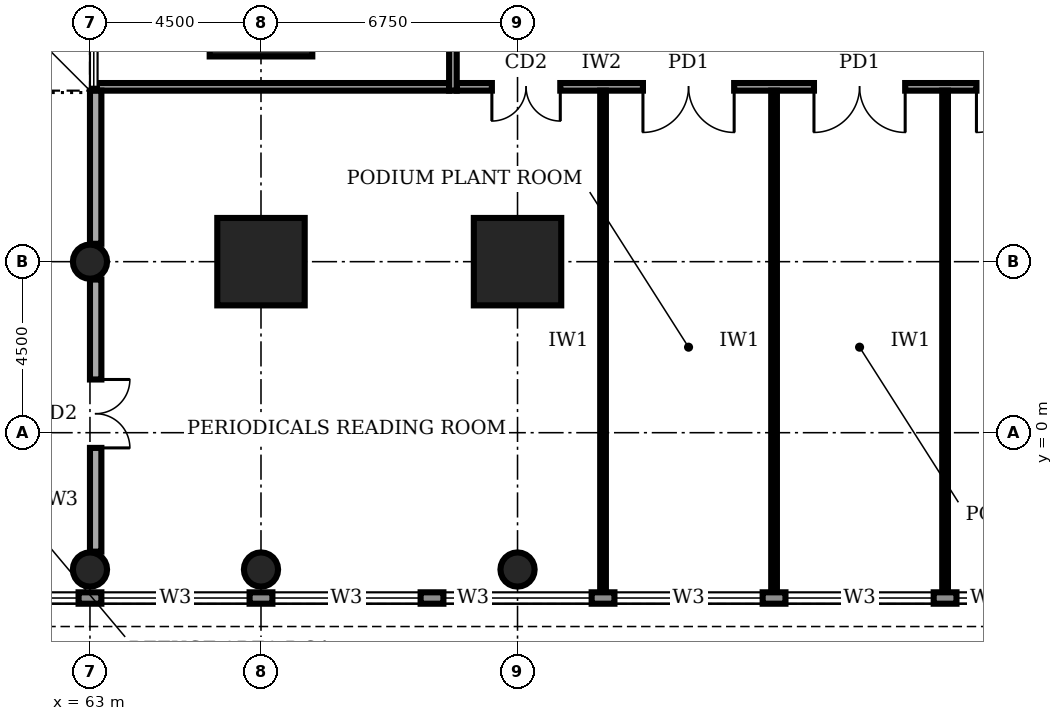
"""IFC4 building model, lengths in metres.
Left out: names, types, materials, properties, quantities, classifications, styles, units other than length and angle.
Written with IfcOpenShell. Run it as: python <this file> out.ifc"""

import sys

from ifc_helpers import new_model, si_unit, direction, frame, frame_2d, origin, origin_2d, place, context, subcontext, project, spatial, rectangle, circle, extrude, element, fill, save


model = new_model("IFC4")
c1 = context("Model", 3, precision=1e-05, world=origin(), true_north=direction((0.0, 1.0)))
c2 = subcontext(c1, "Body", "Model", "MODEL_VIEW")
j1 = project(units=[si_unit("LENGTHUNIT", "METRE"), si_unit("PLANEANGLEUNIT", "RADIAN")], contexts=[c1])
p1 = place(None, origin())
s1 = spatial("IfcSite", under=j1, at=p1, CompositionType="ELEMENT")
p2 = place(p1, origin())
s2 = spatial("IfcBuilding", under=s1, at=p2, CompositionType="ELEMENT")
p3 = place(p2, frame((0.0, 0.0, 16.0)))
s3 = spatial("IfcBuildingStorey", under=s2, at=p3, CompositionType="ELEMENT", Elevation=16.0)
for number, where, z_axis, x_axis in (
    (1, (67.5, 4.5, 0.0), (0.0, 0.0, 1.0), (1.0, 0.0, 0.0)),
    (2, (74.25, 4.5, 0.0), (0.0, 0.0, 1.0), (1.0, 0.0, 0.0)),
):
    element("IfcColumn", number, at=place(p3, frame(where, z_axis=z_axis, x_axis=x_axis)), inside=s3, PredefinedType="COLUMN", context=c2, shape_type="SweptSolid", body=[
        extrude(rectangle(XDim=2.3, YDim=2.3, at=origin_2d()), origin(), (0.0, 0.0, 1.0), 5.0),
    ])
p4 = place(p3, frame((67.5, 11.25, 0.0), z_axis=(0.0, 0.0, 1.0), x_axis=(1.0, 0.0, 0.0)))
e3 = element("IfcColumn", 3, at=p4, inside=s3, PredefinedType="COLUMN", context=c2, shape_type="SweptSolid", body=[
    extrude(rectangle(XDim=2.7, YDim=2.7, at=origin_2d()), origin(), (0.0, 0.0, 1.0), 5.0),
])
for number, where, z_axis, x_axis in (
    (4, (63.0, -3.6, 0.0), (0.0, 0.0, 1.0), (1.0, 0.0, 0.0)),
    (5, (67.5, -3.6, 0.0), (0.0, 0.0, 1.0), (1.0, 0.0, 0.0)),
    (6, (74.25, -3.6, 0.0), (0.0, 0.0, 1.0), (1.0, 0.0, 0.0)),
    (7, (63.0, 4.5, 0.0), (0.0, 0.0, 1.0), (1.0, 0.0, 0.0)),
):
    element("IfcColumn", number, at=place(p3, frame(where, z_axis=z_axis, x_axis=x_axis)), inside=s3, PredefinedType="COLUMN", context=c2, shape_type="SweptSolid", body=[
        extrude(circle(Radius=0.45, at=origin_2d()), origin(), (0.0, 0.0, 1.0), 5.0),
    ])
p5 = place(p3, frame((0.02, -4.35, 0.0), z_axis=(0.0, 0.0, 1.0), x_axis=(1.0, 0.0, 0.0)))
e8 = element("IfcWall", 8, at=p5, inside=s3, PredefinedType="STANDARD", context=c2, shape_type="SweptSolid", body=[
    extrude(rectangle(XDim=98.96, YDim=0.3, at=frame_2d((49.48, 0.0))), origin(), (0.0, 0.0, 1.0), 4.7),
])
p6 = place(p5, frame((4.78, 0.0, 0.95)))
e9 = element("IfcOpeningElement", 9, at=p6, cuts=e8, PredefinedType="OPENING", context=c2, shape_type="SweptSolid", body=[
    extrude(rectangle(XDim=3.9, YDim=1.8, at=frame_2d((1.95, 0.9))), frame((0.0, 0.16, 0.0), z_axis=(0.0, -1.0, 0.0), x_axis=(1.0, 0.0, 0.0)), (0.0, 0.0, 1.0), 0.32),
])
p7 = place(p5, frame((9.28, 0.0, 0.95)))
e10 = element("IfcOpeningElement", 10, at=p7, cuts=e8, PredefinedType="OPENING", context=c2, shape_type="SweptSolid", body=[
    extrude(rectangle(XDim=3.9, YDim=1.8, at=frame_2d((1.95, 0.9))), frame((0.0, 0.16, 0.0), z_axis=(0.0, -1.0, 0.0), x_axis=(1.0, 0.0, 0.0)), (0.0, 0.0, 1.0), 0.32),
])
p8 = place(p5, frame((13.78, 0.0, 0.95)))
e11 = element("IfcOpeningElement", 11, at=p8, cuts=e8, PredefinedType="OPENING", context=c2, shape_type="SweptSolid", body=[
    extrude(rectangle(XDim=3.9, YDim=1.8, at=frame_2d((1.95, 0.9))), frame((0.0, 0.16, 0.0), z_axis=(0.0, -1.0, 0.0), x_axis=(1.0, 0.0, 0.0)), (0.0, 0.0, 1.0), 0.32),
])
p9 = place(p5, frame((18.28, 0.0, 0.95)))
e12 = element("IfcOpeningElement", 12, at=p9, cuts=e8, PredefinedType="OPENING", context=c2, shape_type="SweptSolid", body=[
    extrude(rectangle(XDim=3.9, YDim=1.8, at=frame_2d((1.95, 0.9))), frame((0.0, 0.16, 0.0), z_axis=(0.0, -1.0, 0.0), x_axis=(1.0, 0.0, 0.0)), (0.0, 0.0, 1.0), 0.32),
])
p10 = place(p5, frame((22.78, 0.0, 0.95)))
e13 = element("IfcOpeningElement", 13, at=p10, cuts=e8, PredefinedType="OPENING", context=c2, shape_type="SweptSolid", body=[
    extrude(rectangle(XDim=3.9, YDim=1.8, at=frame_2d((1.95, 0.9))), frame((0.0, 0.16, 0.0), z_axis=(0.0, -1.0, 0.0), x_axis=(1.0, 0.0, 0.0)), (0.0, 0.0, 1.0), 0.32),
])
p11 = place(p5, frame((27.28, 0.0, 0.95)))
e14 = element("IfcOpeningElement", 14, at=p11, cuts=e8, PredefinedType="OPENING", context=c2, shape_type="SweptSolid", body=[
    extrude(rectangle(XDim=3.9, YDim=1.8, at=frame_2d((1.95, 0.9))), frame((0.0, 0.16, 0.0), z_axis=(0.0, -1.0, 0.0), x_axis=(1.0, 0.0, 0.0)), (0.0, 0.0, 1.0), 0.32),
])
p12 = place(p5, frame((31.78, 0.0, 0.95)))
e15 = element("IfcOpeningElement", 15, at=p12, cuts=e8, PredefinedType="OPENING", context=c2, shape_type="SweptSolid", body=[
    extrude(rectangle(XDim=3.9, YDim=1.8, at=frame_2d((1.95, 0.9))), frame((0.0, 0.16, 0.0), z_axis=(0.0, -1.0, 0.0), x_axis=(1.0, 0.0, 0.0)), (0.0, 0.0, 1.0), 0.32),
])
p13 = place(p5, frame((36.28, 0.0, 0.95)))
e16 = element("IfcOpeningElement", 16, at=p13, cuts=e8, PredefinedType="OPENING", context=c2, shape_type="SweptSolid", body=[
    extrude(rectangle(XDim=3.9, YDim=1.8, at=frame_2d((1.95, 0.9))), frame((0.0, 0.16, 0.0), z_axis=(0.0, -1.0, 0.0), x_axis=(1.0, 0.0, 0.0)), (0.0, 0.0, 1.0), 0.32),
])
p14 = place(p5, frame((40.78, 0.0, 0.95)))
e17 = element("IfcOpeningElement", 17, at=p14, cuts=e8, PredefinedType="OPENING", context=c2, shape_type="SweptSolid", body=[
    extrude(rectangle(XDim=3.9, YDim=1.8, at=frame_2d((1.95, 0.9))), frame((0.0, 0.16, 0.0), z_axis=(0.0, -1.0, 0.0), x_axis=(1.0, 0.0, 0.0)), (0.0, 0.0, 1.0), 0.32),
])
p15 = place(p5, frame((45.28, 0.0, 0.95)))
e18 = element("IfcOpeningElement", 18, at=p15, cuts=e8, PredefinedType="OPENING", context=c2, shape_type="SweptSolid", body=[
    extrude(rectangle(XDim=3.9, YDim=1.8, at=frame_2d((1.95, 0.9))), frame((0.0, 0.16, 0.0), z_axis=(0.0, -1.0, 0.0), x_axis=(1.0, 0.0, 0.0)), (0.0, 0.0, 1.0), 0.32),
])
p16 = place(p5, frame((49.78, 0.0, 0.95)))
e19 = element("IfcOpeningElement", 19, at=p16, cuts=e8, PredefinedType="OPENING", context=c2, shape_type="SweptSolid", body=[
    extrude(rectangle(XDim=3.9, YDim=1.8, at=frame_2d((1.95, 0.9))), frame((0.0, 0.16, 0.0), z_axis=(0.0, -1.0, 0.0), x_axis=(1.0, 0.0, 0.0)), (0.0, 0.0, 1.0), 0.32),
])
p17 = place(p5, frame((54.28, 0.0, 0.95)))
e20 = element("IfcOpeningElement", 20, at=p17, cuts=e8, PredefinedType="OPENING", context=c2, shape_type="SweptSolid", body=[
    extrude(rectangle(XDim=3.9, YDim=1.8, at=frame_2d((1.95, 0.9))), frame((0.0, 0.16, 0.0), z_axis=(0.0, -1.0, 0.0), x_axis=(1.0, 0.0, 0.0)), (0.0, 0.0, 1.0), 0.32),
])
p18 = place(p5, frame((58.78, 0.0, 0.95)))
e21 = element("IfcOpeningElement", 21, at=p18, cuts=e8, PredefinedType="OPENING", context=c2, shape_type="SweptSolid", body=[
    extrude(rectangle(XDim=3.9, YDim=1.8, at=frame_2d((1.95, 0.9))), frame((0.0, 0.16, 0.0), z_axis=(0.0, -1.0, 0.0), x_axis=(1.0, 0.0, 0.0)), (0.0, 0.0, 1.0), 0.32),
])
p19 = place(p5, frame((63.28, 0.0, 0.95)))
e22 = element("IfcOpeningElement", 22, at=p19, cuts=e8, PredefinedType="OPENING", context=c2, shape_type="SweptSolid", body=[
    extrude(rectangle(XDim=3.9, YDim=1.8, at=frame_2d((1.95, 0.9))), frame((0.0, 0.16, 0.0), z_axis=(0.0, -1.0, 0.0), x_axis=(1.0, 0.0, 0.0)), (0.0, 0.0, 1.0), 0.32),
])
p20 = place(p5, frame((67.78, 0.0, 0.95)))
e23 = element("IfcOpeningElement", 23, at=p20, cuts=e8, PredefinedType="OPENING", context=c2, shape_type="SweptSolid", body=[
    extrude(rectangle(XDim=3.9, YDim=1.8, at=frame_2d((1.95, 0.9))), frame((0.0, 0.16, 0.0), z_axis=(0.0, -1.0, 0.0), x_axis=(1.0, 0.0, 0.0)), (0.0, 0.0, 1.0), 0.32),
])
p21 = place(p5, frame((72.28, 0.0, 0.95)))
e24 = element("IfcOpeningElement", 24, at=p21, cuts=e8, PredefinedType="OPENING", context=c2, shape_type="SweptSolid", body=[
    extrude(rectangle(XDim=3.9, YDim=1.8, at=frame_2d((1.95, 0.9))), frame((0.0, 0.16, 0.0), z_axis=(0.0, -1.0, 0.0), x_axis=(1.0, 0.0, 0.0)), (0.0, 0.0, 1.0), 0.32),
])
p22 = place(p5, frame((76.78, 0.0, 0.95)))
e25 = element("IfcOpeningElement", 25, at=p22, cuts=e8, PredefinedType="OPENING", context=c2, shape_type="SweptSolid", body=[
    extrude(rectangle(XDim=3.9, YDim=1.8, at=frame_2d((1.95, 0.9))), frame((0.0, 0.16, 0.0), z_axis=(0.0, -1.0, 0.0), x_axis=(1.0, 0.0, 0.0)), (0.0, 0.0, 1.0), 0.32),
])
p23 = place(p5, frame((81.28, 0.0, 0.95)))
e26 = element("IfcOpeningElement", 26, at=p23, cuts=e8, PredefinedType="OPENING", context=c2, shape_type="SweptSolid", body=[
    extrude(rectangle(XDim=3.9, YDim=1.8, at=frame_2d((1.95, 0.9))), frame((0.0, 0.16, 0.0), z_axis=(0.0, -1.0, 0.0), x_axis=(1.0, 0.0, 0.0)), (0.0, 0.0, 1.0), 0.32),
])
p24 = place(p5, frame((85.78, 0.0, 0.95)))
e27 = element("IfcOpeningElement", 27, at=p24, cuts=e8, PredefinedType="OPENING", context=c2, shape_type="SweptSolid", body=[
    extrude(rectangle(XDim=3.9, YDim=1.8, at=frame_2d((1.95, 0.9))), frame((0.0, 0.16, 0.0), z_axis=(0.0, -1.0, 0.0), x_axis=(1.0, 0.0, 0.0)), (0.0, 0.0, 1.0), 0.32),
])
p25 = place(p5, frame((90.28, 0.0, 0.95)))
e28 = element("IfcOpeningElement", 28, at=p25, cuts=e8, PredefinedType="OPENING", context=c2, shape_type="SweptSolid", body=[
    extrude(rectangle(XDim=3.9, YDim=1.8, at=frame_2d((1.95, 0.9))), frame((0.0, 0.16, 0.0), z_axis=(0.0, -1.0, 0.0), x_axis=(1.0, 0.0, 0.0)), (0.0, 0.0, 1.0), 0.32),
])
p26 = place(p5, frame((94.78, 0.0, 0.95)))
e29 = element("IfcOpeningElement", 29, at=p26, cuts=e8, PredefinedType="OPENING", context=c2, shape_type="SweptSolid", body=[
    extrude(rectangle(XDim=3.9, YDim=1.8, at=frame_2d((1.95, 0.9))), frame((0.0, 0.16, 0.0), z_axis=(0.0, -1.0, 0.0), x_axis=(1.0, 0.0, 0.0)), (0.0, 0.0, 1.0), 0.32),
])
p27 = place(p3, frame((72.65, 9.1, 0.0), z_axis=(0.0, 0.0, 1.0), x_axis=(1.0, 0.0, 0.0)))
e30 = element("IfcWall", 30, at=p27, inside=s3, PredefinedType="SOLIDWALL", context=c2, shape_type="SweptSolid", body=[
    extrude(rectangle(XDim=16.9, YDim=0.2, at=frame_2d((8.45, 0.0))), origin(), (0.0, 0.0, 1.0), 4.7),
])
p28 = place(p27, frame((0.925, 0.0, 0.0)))
e31 = element("IfcOpeningElement", 31, at=p28, cuts=e30, PredefinedType="OPENING", context=c2, shape_type="SweptSolid", body=[
    extrude(rectangle(XDim=1.8, YDim=2.1, at=frame_2d((0.9, 1.05))), frame((0.0, 0.11, 0.0), z_axis=(0.0, -1.0, 0.0), x_axis=(1.0, 0.0, 0.0)), (0.0, 0.0, 1.0), 0.22),
])
p29 = place(p27, frame((4.9, 0.0, 0.0)))
e32 = element("IfcOpeningElement", 32, at=p29, cuts=e30, PredefinedType="OPENING", context=c2, shape_type="SweptSolid", body=[
    extrude(rectangle(XDim=2.4, YDim=2.7, at=frame_2d((1.2, 1.35))), frame((0.0, 0.11, 0.0), z_axis=(0.0, -1.0, 0.0), x_axis=(1.0, 0.0, 0.0)), (0.0, 0.0, 1.0), 0.22),
])
p30 = place(p27, frame((9.4, 0.0, 0.0)))
e33 = element("IfcOpeningElement", 33, at=p30, cuts=e30, PredefinedType="OPENING", context=c2, shape_type="SweptSolid", body=[
    extrude(rectangle(XDim=2.4, YDim=2.7, at=frame_2d((1.2, 1.35))), frame((0.0, 0.11, 0.0), z_axis=(0.0, -1.0, 0.0), x_axis=(1.0, 0.0, 0.0)), (0.0, 0.0, 1.0), 0.22),
])
p31 = place(p27, frame((13.675, 0.0, 0.0)))
e34 = element("IfcOpeningElement", 34, at=p31, cuts=e30, PredefinedType="OPENING", context=c2, shape_type="SweptSolid", body=[
    extrude(rectangle(XDim=2.4, YDim=2.7, at=frame_2d((1.2, 1.35))), frame((0.0, 0.11, 0.0), z_axis=(0.0, -1.0, 0.0), x_axis=(1.0, 0.0, 0.0)), (0.0, 0.0, 1.0), 0.22),
])
p32 = place(p3, frame((72.55, 31.3, 0.0), z_axis=(0.0, 0.0, 1.0), x_axis=(0.0, -1.0, 0.0)))
e35 = element("IfcWall", 35, at=p32, inside=s3, PredefinedType="SOLIDWALL", context=c2, shape_type="SweptSolid", body=[
    extrude(rectangle(XDim=22.3, YDim=0.2, at=frame_2d((11.15, 0.0))), origin(), (0.0, 0.0, 1.0), 4.7),
])
p33 = place(p32, frame((17.3, 0.0, 0.0)))
e36 = element("IfcOpeningElement", 36, at=p33, cuts=e35, PredefinedType="OPENING", context=c2, shape_type="SweptSolid", body=[
    extrude(rectangle(XDim=1.0, YDim=2.1, at=frame_2d((0.5, 1.05))), frame((0.0, 0.11, 0.0), z_axis=(0.0, -1.0, 0.0), x_axis=(1.0, 0.0, 0.0)), (0.0, 0.0, 1.0), 0.22),
])
p34 = place(p32, frame((5.65, 0.0, 0.0)))
e37 = element("IfcOpeningElement", 37, at=p34, cuts=e35, PredefinedType="OPENING", context=c2, shape_type="SweptSolid", body=[
    extrude(rectangle(XDim=1.8, YDim=2.1, at=frame_2d((0.9, 1.05))), frame((0.0, 0.11, 0.0), z_axis=(0.0, -1.0, 0.0), x_axis=(1.0, 0.0, 0.0)), (0.0, 0.0, 1.0), 0.22),
])
p35 = place(p3, frame((63.18, 9.1, 0.0), z_axis=(0.0, 0.0, 1.0), x_axis=(1.0, 0.0, 0.0)))
e38 = element("IfcWall", 38, at=p35, inside=s3, PredefinedType="SOLIDWALL", context=c2, shape_type="SweptSolid", body=[
    extrude(rectangle(XDim=9.27, YDim=0.2, at=frame_2d((4.635, 0.0))), origin(), (0.0, 0.0, 1.0), 4.7),
])
for number, where, z_axis, x_axis in (
    (39, (76.5, -4.2, 0.0), (0.0, 0.0, 1.0), (0.0, 1.0, 0.0)),
    (40, (81.0, -4.2, 0.0), (0.0, 0.0, 1.0), (0.0, 1.0, 0.0)),
    (41, (85.5, -4.2, 0.0), (0.0, 0.0, 1.0), (0.0, 1.0, 0.0)),
):
    element("IfcWall", number, at=place(p3, frame(where, z_axis=z_axis, x_axis=x_axis)), inside=s3, PredefinedType="PARTITIONING", context=c2, shape_type="SweptSolid", body=[
        extrude(rectangle(XDim=13.2, YDim=0.15, at=frame_2d((6.6, 0.0))), origin(), (0.0, 0.0, 1.0), 4.7),
    ])
p36 = place(p3, frame((63.15, -3.13, 0.0), z_axis=(0.0, 0.0, 1.0), x_axis=(0.0, 1.0, 0.0)))
e42 = element("IfcWall", 42, at=p36, inside=s3, PredefinedType="SOLIDWALL", context=c2, shape_type="SweptSolid", body=[
    extrude(rectangle(XDim=7.16, YDim=0.3, at=frame_2d((3.58, 0.0))), origin(), (0.0, 0.0, 1.0), 3.7),
])
p37 = place(p36, frame((2.73, 0.0, 0.0)))
e43 = element("IfcOpeningElement", 43, at=p37, cuts=e42, PredefinedType="OPENING", context=c2, shape_type="SweptSolid", body=[
    extrude(rectangle(XDim=1.8, YDim=2.1, at=frame_2d((0.9, 1.05))), frame((0.0, 0.16, 0.0), z_axis=(0.0, -1.0, 0.0), x_axis=(1.0, 0.0, 0.0)), (0.0, 0.0, 1.0), 0.32),
])
p38 = place(p3, frame((63.15, 4.97, 0.0), z_axis=(0.0, 0.0, 1.0), x_axis=(0.0, 1.0, 0.0)))
e44 = element("IfcWall", 44, at=p38, inside=s3, PredefinedType="SOLIDWALL", context=c2, shape_type="SweptSolid", body=[
    extrude(rectangle(XDim=4.03, YDim=0.3, at=frame_2d((2.015, 0.0))), origin(), (0.0, 0.0, 1.0), 4.7),
])
p39 = place(p18, origin())
e45 = element("IfcWindow", 45, at=p39, inside=s3, PartitioningType="SINGLE_PANEL", PredefinedType="WINDOW", context=c2, shape_type="SweptSolid", body=[
    extrude(rectangle(XDim=3.9, YDim=1.8, at=frame_2d((1.95, 0.9))), frame((0.0, 0.03, 0.0), z_axis=(0.0, -1.0, 0.0), x_axis=(1.0, 0.0, 0.0)), (0.0, 0.0, 1.0), 0.06),
])
fill(e21, e45)
p40 = place(p19, origin())
e46 = element("IfcWindow", 46, at=p40, inside=s3, PartitioningType="SINGLE_PANEL", PredefinedType="WINDOW", context=c2, shape_type="SweptSolid", body=[
    extrude(rectangle(XDim=3.9, YDim=1.8, at=frame_2d((1.95, 0.9))), frame((0.0, 0.03, 0.0), z_axis=(0.0, -1.0, 0.0), x_axis=(1.0, 0.0, 0.0)), (0.0, 0.0, 1.0), 0.06),
])
fill(e22, e46)
p41 = place(p20, origin())
e47 = element("IfcWindow", 47, at=p41, inside=s3, PartitioningType="SINGLE_PANEL", PredefinedType="WINDOW", context=c2, shape_type="SweptSolid", body=[
    extrude(rectangle(XDim=3.9, YDim=1.8, at=frame_2d((1.95, 0.9))), frame((0.0, 0.03, 0.0), z_axis=(0.0, -1.0, 0.0), x_axis=(1.0, 0.0, 0.0)), (0.0, 0.0, 1.0), 0.06),
])
fill(e23, e47)
p42 = place(p21, origin())
e48 = element("IfcWindow", 48, at=p42, inside=s3, PartitioningType="SINGLE_PANEL", PredefinedType="WINDOW", context=c2, shape_type="SweptSolid", body=[
    extrude(rectangle(XDim=3.9, YDim=1.8, at=frame_2d((1.95, 0.9))), frame((0.0, 0.03, 0.0), z_axis=(0.0, -1.0, 0.0), x_axis=(1.0, 0.0, 0.0)), (0.0, 0.0, 1.0), 0.06),
])
fill(e24, e48)
p43 = place(p22, origin())
e49 = element("IfcWindow", 49, at=p43, inside=s3, PartitioningType="SINGLE_PANEL", PredefinedType="WINDOW", context=c2, shape_type="SweptSolid", body=[
    extrude(rectangle(XDim=3.9, YDim=1.8, at=frame_2d((1.95, 0.9))), frame((0.0, 0.03, 0.0), z_axis=(0.0, -1.0, 0.0), x_axis=(1.0, 0.0, 0.0)), (0.0, 0.0, 1.0), 0.06),
])
fill(e25, e49)
p44 = place(p23, origin())
e50 = element("IfcWindow", 50, at=p44, inside=s3, PartitioningType="SINGLE_PANEL", PredefinedType="WINDOW", context=c2, shape_type="SweptSolid", body=[
    extrude(rectangle(XDim=3.9, YDim=1.8, at=frame_2d((1.95, 0.9))), frame((0.0, 0.03, 0.0), z_axis=(0.0, -1.0, 0.0), x_axis=(1.0, 0.0, 0.0)), (0.0, 0.0, 1.0), 0.06),
])
fill(e26, e50)
p45 = place(p24, origin())
e51 = element("IfcWindow", 51, at=p45, inside=s3, PartitioningType="SINGLE_PANEL", PredefinedType="WINDOW", context=c2, shape_type="SweptSolid", body=[
    extrude(rectangle(XDim=3.9, YDim=1.8, at=frame_2d((1.95, 0.9))), frame((0.0, 0.03, 0.0), z_axis=(0.0, -1.0, 0.0), x_axis=(1.0, 0.0, 0.0)), (0.0, 0.0, 1.0), 0.06),
])
fill(e27, e51)
p46 = place(p28, frame((1.8, 0.0, 0.0), z_axis=(0.0, 0.0, 1.0), x_axis=(-1.0, 0.0, 0.0)))
e52 = element("IfcDoor", 52, at=p46, inside=s3, OperationType="DOUBLE_DOOR_SINGLE_SWING", PredefinedType="DOOR", context=c2, shape_type="SweptSolid", body=[
    extrude(rectangle(XDim=1.8, YDim=2.1, at=frame_2d((0.9, 1.05))), frame((0.0, 0.025, 0.0), z_axis=(0.0, -1.0, 0.0), x_axis=(1.0, 0.0, 0.0)), (0.0, 0.0, 1.0), 0.05),
])
fill(e31, e52)
p47 = place(p29, frame((2.4, 0.0, 0.0), z_axis=(0.0, 0.0, 1.0), x_axis=(-1.0, 0.0, 0.0)))
e53 = element("IfcDoor", 53, at=p47, inside=s3, OperationType="DOUBLE_DOOR_SINGLE_SWING", PredefinedType="DOOR", context=c2, shape_type="SweptSolid", body=[
    extrude(rectangle(XDim=2.4, YDim=2.7, at=frame_2d((1.2, 1.35))), frame((0.0, 0.025, 0.0), z_axis=(0.0, -1.0, 0.0), x_axis=(1.0, 0.0, 0.0)), (0.0, 0.0, 1.0), 0.05),
])
fill(e32, e53)
p48 = place(p30, frame((2.4, 0.0, 0.0), z_axis=(0.0, 0.0, 1.0), x_axis=(-1.0, 0.0, 0.0)))
e54 = element("IfcDoor", 54, at=p48, inside=s3, OperationType="DOUBLE_DOOR_SINGLE_SWING", PredefinedType="DOOR", context=c2, shape_type="SweptSolid", body=[
    extrude(rectangle(XDim=2.4, YDim=2.7, at=frame_2d((1.2, 1.35))), frame((0.0, 0.025, 0.0), z_axis=(0.0, -1.0, 0.0), x_axis=(1.0, 0.0, 0.0)), (0.0, 0.0, 1.0), 0.05),
])
fill(e33, e54)
p49 = place(p31, frame((2.4, 0.0, 0.0), z_axis=(0.0, 0.0, 1.0), x_axis=(-1.0, 0.0, 0.0)))
e55 = element("IfcDoor", 55, at=p49, inside=s3, OperationType="DOUBLE_DOOR_SINGLE_SWING", PredefinedType="DOOR", context=c2, shape_type="SweptSolid", body=[
    extrude(rectangle(XDim=2.4, YDim=2.7, at=frame_2d((1.2, 1.35))), frame((0.0, 0.025, 0.0), z_axis=(0.0, -1.0, 0.0), x_axis=(1.0, 0.0, 0.0)), (0.0, 0.0, 1.0), 0.05),
])
fill(e34, e55)
p50 = place(p37, frame((1.8, 0.0, 0.0), z_axis=(0.0, 0.0, 1.0), x_axis=(-1.0, 0.0, 0.0)))
e56 = element("IfcDoor", 56, at=p50, inside=s3, OperationType="DOUBLE_DOOR_SINGLE_SWING", PredefinedType="DOOR", context=c2, shape_type="SweptSolid", body=[
    extrude(rectangle(XDim=1.8, YDim=2.1, at=frame_2d((0.9, 1.05))), frame((0.0, 0.025, 0.0), z_axis=(0.0, -1.0, 0.0), x_axis=(1.0, 0.0, 0.0)), (0.0, 0.0, 1.0), 0.05),
])
fill(e43, e56)
save(model, sys.argv[1])
